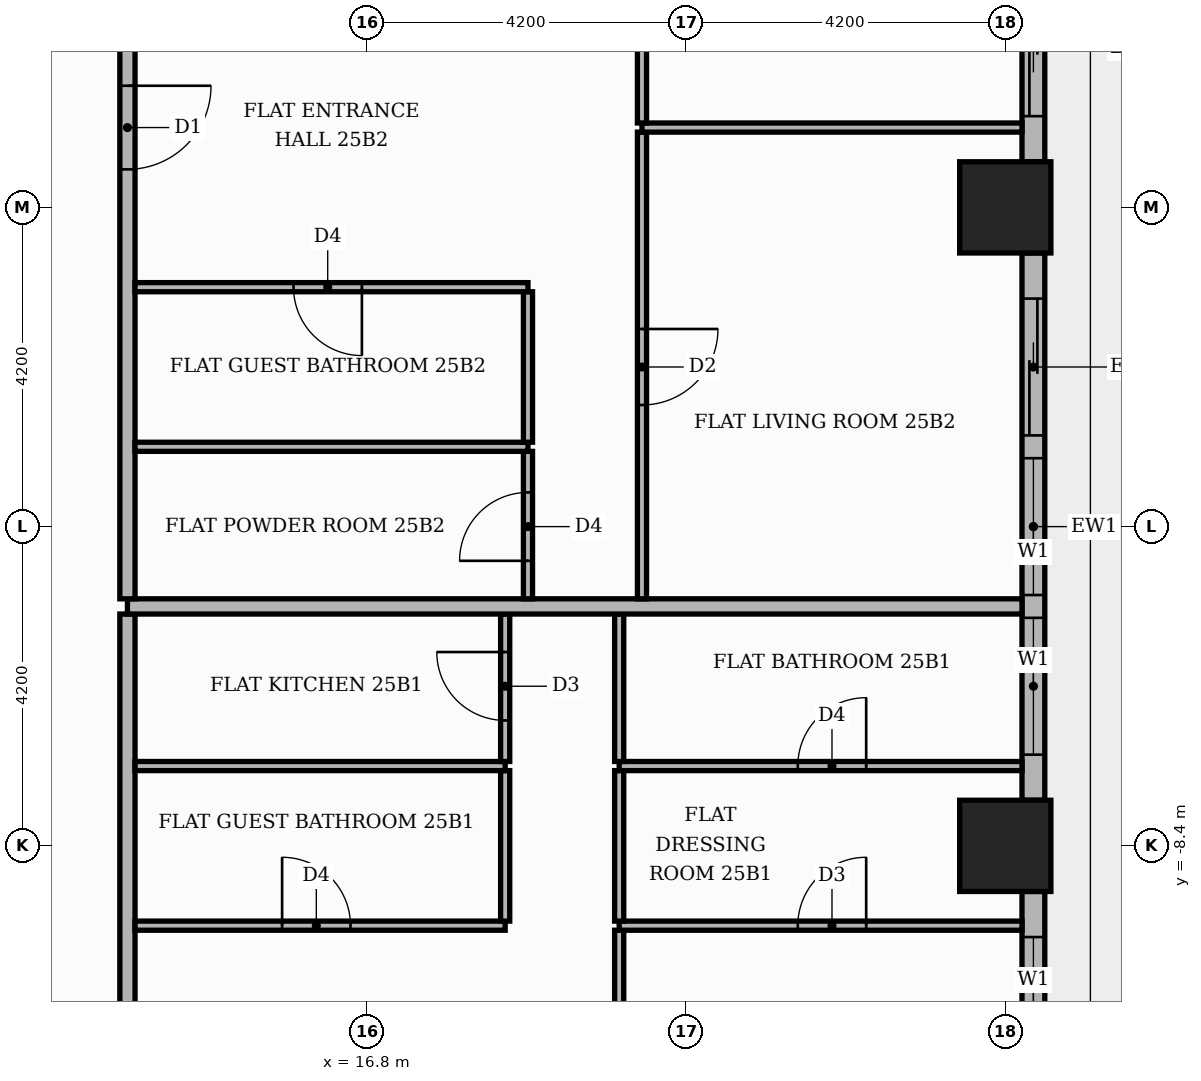
"""IFC4 building model, lengths in metres.
Left out: names, types, materials, properties, quantities, classifications, styles, units other than length and angle.
Written with IfcOpenShell. Run it as: python <this file> out.ifc"""

import sys

from ifc_helpers import new_model, si_unit, direction, frame, frame_2d, origin, origin_2d, place, context, subcontext, project, spatial, rectangle, extrude, element, fill, save


model = new_model("IFC4")
c1 = context("Model", 3, precision=1e-05, world=origin(), true_north=direction((0.0, 1.0)))
c2 = subcontext(c1, "Body", "Model", "MODEL_VIEW")
j1 = project(units=[si_unit("LENGTHUNIT", "METRE"), si_unit("PLANEANGLEUNIT", "RADIAN")], contexts=[c1])
p1 = place(None, origin())
s1 = spatial("IfcSite", under=j1, at=p1, CompositionType="ELEMENT")
p2 = place(p1, origin())
s2 = spatial("IfcBuilding", under=s1, at=p2, CompositionType="ELEMENT")
p3 = place(p2, frame((0.0, 0.0, 106.5)))
s3 = spatial("IfcBuildingStorey", under=s2, at=p3, CompositionType="ELEMENT", Elevation=106.5)
for number, where, z_axis, x_axis in (
    (1, (25.2, 0.0, 0.0), (0.0, 0.0, 1.0), (1.0, 0.0, 0.0)),
    (2, (25.2, -8.4, 0.0), (0.0, 0.0, 1.0), (1.0, 0.0, 0.0)),
):
    element("IfcColumn", number, at=place(p3, frame(where, z_axis=z_axis, x_axis=x_axis)), inside=s3, PredefinedType="COLUMN", context=c2, shape_type="SweptSolid", body=[
        extrude(rectangle(XDim=1.2, YDim=1.2, at=origin_2d()), origin(), (0.0, 0.0, 1.0), 3.9),
    ])
p4 = place(p3, frame((25.57, -16.2, 0.0), z_axis=(0.0, 0.0, 1.0), x_axis=(0.0, 1.0, 0.0)))
e3 = element("IfcWall", 3, at=p4, inside=s3, PredefinedType="STANDARD", context=c2, shape_type="SweptSolid", body=[
    extrude(rectangle(XDim=7.2, YDim=0.3, at=frame_2d((3.6, 0.0))), origin(), (0.0, 0.0, 1.0), 3.48),
])
p5 = place(p4, frame((0.6, 0.0, 0.0)))
e4 = element("IfcOpeningElement", 4, at=p5, cuts=e3, PredefinedType="OPENING", context=c2, shape_type="SweptSolid", body=[
    extrude(rectangle(XDim=1.8, YDim=2.4, at=frame_2d((0.9, 1.2))), frame((0.0, 0.16, 0.0), z_axis=(0.0, -1.0, 0.0), x_axis=(1.0, 0.0, 0.0)), (0.0, 0.0, 1.0), 0.32),
])
p6 = place(p4, frame((2.7, 0.0, 0.0)))
e5 = element("IfcOpeningElement", 5, at=p6, cuts=e3, PredefinedType="OPENING", context=c2, shape_type="SweptSolid", body=[
    extrude(rectangle(XDim=1.8, YDim=2.4, at=frame_2d((0.9, 1.2))), frame((0.0, 0.16, 0.0), z_axis=(0.0, -1.0, 0.0), x_axis=(1.0, 0.0, 0.0)), (0.0, 0.0, 1.0), 0.32),
])
p7 = place(p4, frame((4.8, 0.0, 0.9)))
e6 = element("IfcOpeningElement", 6, at=p7, cuts=e3, PredefinedType="OPENING", context=c2, shape_type="SweptSolid", body=[
    extrude(rectangle(XDim=1.8, YDim=2.1, at=frame_2d((0.9, 1.05))), frame((0.0, 0.16, 0.0), z_axis=(0.0, -1.0, 0.0), x_axis=(1.0, 0.0, 0.0)), (0.0, 0.0, 1.0), 0.32),
])
p8 = place(p3, frame((25.57, -7.8, 0.0), z_axis=(0.0, 0.0, 1.0), x_axis=(0.0, 1.0, 0.0)))
e7 = element("IfcWall", 7, at=p8, inside=s3, PredefinedType="STANDARD", context=c2, shape_type="SweptSolid", body=[
    extrude(rectangle(XDim=7.2, YDim=0.3, at=frame_2d((3.6, 0.0))), origin(), (0.0, 0.0, 1.0), 3.48),
])
p9 = place(p8, frame((0.6, 0.0, 0.9)))
e8 = element("IfcOpeningElement", 8, at=p9, cuts=e7, PredefinedType="OPENING", context=c2, shape_type="SweptSolid", body=[
    extrude(rectangle(XDim=1.8, YDim=2.1, at=frame_2d((0.9, 1.05))), frame((0.0, 0.16, 0.0), z_axis=(0.0, -1.0, 0.0), x_axis=(1.0, 0.0, 0.0)), (0.0, 0.0, 1.0), 0.32),
])
p10 = place(p8, frame((2.7, 0.0, 0.9)))
e9 = element("IfcOpeningElement", 9, at=p10, cuts=e7, PredefinedType="OPENING", context=c2, shape_type="SweptSolid", body=[
    extrude(rectangle(XDim=1.8, YDim=2.1, at=frame_2d((0.9, 1.05))), frame((0.0, 0.16, 0.0), z_axis=(0.0, -1.0, 0.0), x_axis=(1.0, 0.0, 0.0)), (0.0, 0.0, 1.0), 0.32),
])
p11 = place(p8, frame((4.8, 0.0, 0.0)))
e10 = element("IfcOpeningElement", 10, at=p11, cuts=e7, PredefinedType="OPENING", context=c2, shape_type="SweptSolid", body=[
    extrude(rectangle(XDim=1.8, YDim=2.4, at=frame_2d((0.9, 1.2))), frame((0.0, 0.16, 0.0), z_axis=(0.0, -1.0, 0.0), x_axis=(1.0, 0.0, 0.0)), (0.0, 0.0, 1.0), 0.32),
])
p12 = place(p3, frame((25.57, 0.6, 0.0), z_axis=(0.0, 0.0, 1.0), x_axis=(0.0, 1.0, 0.0)))
e11 = element("IfcWall", 11, at=p12, inside=s3, PredefinedType="STANDARD", context=c2, shape_type="SweptSolid", body=[
    extrude(rectangle(XDim=7.2, YDim=0.3, at=frame_2d((3.6, 0.0))), origin(), (0.0, 0.0, 1.0), 3.48),
])
p13 = place(p12, frame((0.6, 0.0, 0.0)))
e12 = element("IfcOpeningElement", 12, at=p13, cuts=e11, PredefinedType="OPENING", context=c2, shape_type="SweptSolid", body=[
    extrude(rectangle(XDim=1.8, YDim=2.4, at=frame_2d((0.9, 1.2))), frame((0.0, 0.16, 0.0), z_axis=(0.0, -1.0, 0.0), x_axis=(1.0, 0.0, 0.0)), (0.0, 0.0, 1.0), 0.32),
])
p14 = place(p12, frame((2.7, 0.0, 0.9)))
e13 = element("IfcOpeningElement", 13, at=p14, cuts=e11, PredefinedType="OPENING", context=c2, shape_type="SweptSolid", body=[
    extrude(rectangle(XDim=1.8, YDim=2.1, at=frame_2d((0.9, 1.05))), frame((0.0, 0.16, 0.0), z_axis=(0.0, -1.0, 0.0), x_axis=(1.0, 0.0, 0.0)), (0.0, 0.0, 1.0), 0.32),
])
p15 = place(p12, frame((4.8, 0.0, 0.9)))
e14 = element("IfcOpeningElement", 14, at=p15, cuts=e11, PredefinedType="OPENING", context=c2, shape_type="SweptSolid", body=[
    extrude(rectangle(XDim=1.8, YDim=2.1, at=frame_2d((0.9, 1.05))), frame((0.0, 0.16, 0.0), z_axis=(0.0, -1.0, 0.0), x_axis=(1.0, 0.0, 0.0)), (0.0, 0.0, 1.0), 0.32),
])
p16 = place(p3, frame((20.12, -13.59, 0.0), z_axis=(0.0, 0.0, 1.0), x_axis=(0.0, 1.0, 0.0)))
e15 = element("IfcWall", 15, at=p16, inside=s3, PredefinedType="PARTITIONING", context=c2, shape_type="SweptSolid", body=[
    extrude(rectangle(XDim=4.08, YDim=0.12, at=frame_2d((2.04, 0.0))), origin(), (0.0, 0.0, 1.0), 3.48),
])
p17 = place(p16, frame((1.59, 0.0, 0.0)))
e16 = element("IfcOpeningElement", 16, at=p17, cuts=e15, PredefinedType="OPENING", context=c2, shape_type="SweptSolid", body=[
    extrude(rectangle(XDim=0.9, YDim=2.1, at=frame_2d((0.45, 1.05))), frame((0.0, 0.07, 0.0), z_axis=(0.0, -1.0, 0.0), x_axis=(1.0, 0.0, 0.0)), (0.0, 0.0, 1.0), 0.14),
])
p18 = place(p3, frame((13.65, -13.55, 0.0), z_axis=(0.0, 0.0, 1.0), x_axis=(0.0, 1.0, 0.0)))
e17 = element("IfcWall", 17, at=p18, inside=s3, PredefinedType="PARTITIONING", context=c2, shape_type="SweptSolid", body=[
    extrude(rectangle(XDim=8.2, YDim=0.2, at=frame_2d((4.1, 0.0))), origin(), (0.0, 0.0, 1.0), 3.48),
])
p19 = place(p18, frame((1.45, 0.0, 0.0)))
e18 = element("IfcOpeningElement", 18, at=p19, cuts=e17, PredefinedType="OPENING", context=c2, shape_type="SweptSolid", body=[
    extrude(rectangle(XDim=1.1, YDim=2.4, at=frame_2d((0.55, 1.2))), frame((0.0, 0.11, 0.0), z_axis=(0.0, -1.0, 0.0), x_axis=(1.0, 0.0, 0.0)), (0.0, 0.0, 1.0), 0.22),
])
p20 = place(p3, frame((13.75, -9.45, 0.0), z_axis=(0.0, 0.0, 1.0), x_axis=(1.0, 0.0, 0.0)))
e19 = element("IfcWall", 19, at=p20, inside=s3, PredefinedType="PARTITIONING", context=c2, shape_type="SweptSolid", body=[
    extrude(rectangle(XDim=4.87, YDim=0.12, at=frame_2d((2.435, 0.0))), origin(), (0.0, 0.0, 1.0), 3.48),
])
p21 = place(p20, frame((1.935, 0.0, 0.0)))
e20 = element("IfcOpeningElement", 20, at=p21, cuts=e19, PredefinedType="OPENING", context=c2, shape_type="SweptSolid", body=[
    extrude(rectangle(XDim=0.9, YDim=2.1, at=frame_2d((0.45, 1.05))), frame((0.0, 0.07, 0.0), z_axis=(0.0, -1.0, 0.0), x_axis=(1.0, 0.0, 0.0)), (0.0, 0.0, 1.0), 0.14),
])
p22 = place(p3, frame((20.12, -9.45, 0.0), z_axis=(0.0, 0.0, 1.0), x_axis=(1.0, 0.0, 0.0)))
e21 = element("IfcWall", 21, at=p22, inside=s3, PredefinedType="PARTITIONING", context=c2, shape_type="SweptSolid", body=[
    extrude(rectangle(XDim=5.3, YDim=0.12, at=frame_2d((2.65, 0.0))), origin(), (0.0, 0.0, 1.0), 3.48),
])
p23 = place(p22, frame((2.35, 0.0, 0.0)))
e22 = element("IfcOpeningElement", 22, at=p23, cuts=e21, PredefinedType="OPENING", context=c2, shape_type="SweptSolid", body=[
    extrude(rectangle(XDim=0.9, YDim=2.1, at=frame_2d((0.45, 1.05))), frame((0.0, 0.07, 0.0), z_axis=(0.0, -1.0, 0.0), x_axis=(1.0, 0.0, 0.0)), (0.0, 0.0, 1.0), 0.14),
])
for number, where, z_axis, x_axis in (
    (23, (18.62, -9.39, 0.0), (0.0, 0.0, 1.0), (0.0, 1.0, 0.0)),
    (24, (20.12, -9.39, 0.0), (0.0, 0.0, 1.0), (0.0, 1.0, 0.0)),
):
    element("IfcWall", number, at=place(p3, frame(where, z_axis=z_axis, x_axis=x_axis)), inside=s3, PredefinedType="PARTITIONING", context=c2, shape_type="SweptSolid", body=[
        extrude(rectangle(XDim=1.98, YDim=0.12, at=frame_2d((0.99, 0.0))), origin(), (0.0, 0.0, 1.0), 3.48),
    ])
p24 = place(p3, frame((13.75, -7.35, 0.0), z_axis=(0.0, 0.0, 1.0), x_axis=(1.0, 0.0, 0.0)))
e25 = element("IfcWall", 25, at=p24, inside=s3, PredefinedType="PARTITIONING", context=c2, shape_type="SweptSolid", body=[
    extrude(rectangle(XDim=4.87, YDim=0.12, at=frame_2d((2.435, 0.0))), origin(), (0.0, 0.0, 1.0), 3.48),
])
p25 = place(p3, frame((20.12, -7.35, 0.0), z_axis=(0.0, 0.0, 1.0), x_axis=(1.0, 0.0, 0.0)))
e26 = element("IfcWall", 26, at=p25, inside=s3, PredefinedType="PARTITIONING", context=c2, shape_type="SweptSolid", body=[
    extrude(rectangle(XDim=5.3, YDim=0.12, at=frame_2d((2.65, 0.0))), origin(), (0.0, 0.0, 1.0), 3.48),
])
p26 = place(p25, frame((2.35, 0.0, 0.0)))
e27 = element("IfcOpeningElement", 27, at=p26, cuts=e26, PredefinedType="OPENING", context=c2, shape_type="SweptSolid", body=[
    extrude(rectangle(XDim=0.9, YDim=2.1, at=frame_2d((0.45, 1.05))), frame((0.0, 0.07, 0.0), z_axis=(0.0, -1.0, 0.0), x_axis=(1.0, 0.0, 0.0)), (0.0, 0.0, 1.0), 0.14),
])
p27 = place(p3, frame((18.62, -7.29, 0.0), z_axis=(0.0, 0.0, 1.0), x_axis=(0.0, 1.0, 0.0)))
e28 = element("IfcWall", 28, at=p27, inside=s3, PredefinedType="PARTITIONING", context=c2, shape_type="SweptSolid", body=[
    extrude(rectangle(XDim=1.94, YDim=0.12, at=frame_2d((0.97, 0.0))), origin(), (0.0, 0.0, 1.0), 3.48),
])
p28 = place(p27, frame((0.54, 0.0, 0.0)))
e29 = element("IfcOpeningElement", 29, at=p28, cuts=e28, PredefinedType="OPENING", context=c2, shape_type="SweptSolid", body=[
    extrude(rectangle(XDim=0.9, YDim=2.1, at=frame_2d((0.45, 1.05))), frame((0.0, 0.07, 0.0), z_axis=(0.0, -1.0, 0.0), x_axis=(1.0, 0.0, 0.0)), (0.0, 0.0, 1.0), 0.14),
])
p29 = place(p3, frame((20.12, -7.29, 0.0), z_axis=(0.0, 0.0, 1.0), x_axis=(0.0, 1.0, 0.0)))
e30 = element("IfcWall", 30, at=p29, inside=s3, PredefinedType="PARTITIONING", context=c2, shape_type="SweptSolid", body=[
    extrude(rectangle(XDim=1.94, YDim=0.12, at=frame_2d((0.97, 0.0))), origin(), (0.0, 0.0, 1.0), 3.48),
])
p30 = place(p3, frame((13.65, -5.25, 0.0), z_axis=(0.0, 0.0, 1.0), x_axis=(1.0, 0.0, 0.0)))
e31 = element("IfcWall", 31, at=p30, inside=s3, PredefinedType="PARTITIONING", context=c2, shape_type="SweptSolid", body=[
    extrude(rectangle(XDim=11.77, YDim=0.2, at=frame_2d((5.885, 0.0))), origin(), (0.0, 0.0, 1.0), 3.48),
])
p31 = place(p3, frame((13.65, -5.15, 0.0), z_axis=(0.0, 0.0, 1.0), x_axis=(0.0, 1.0, 0.0)))
e32 = element("IfcWall", 32, at=p31, inside=s3, PredefinedType="PARTITIONING", context=c2, shape_type="SweptSolid", body=[
    extrude(rectangle(XDim=18.7, YDim=0.2, at=frame_2d((9.35, 0.0))), origin(), (0.0, 0.0, 1.0), 3.48),
])
p32 = place(p31, frame((5.65, 0.0, 0.0)))
e33 = element("IfcOpeningElement", 33, at=p32, cuts=e32, PredefinedType="OPENING", context=c2, shape_type="SweptSolid", body=[
    extrude(rectangle(XDim=1.1, YDim=2.4, at=frame_2d((0.55, 1.2))), frame((0.0, 0.11, 0.0), z_axis=(0.0, -1.0, 0.0), x_axis=(1.0, 0.0, 0.0)), (0.0, 0.0, 1.0), 0.22),
])
p33 = place(p3, frame((18.92, -5.15, 0.0), z_axis=(0.0, 0.0, 1.0), x_axis=(0.0, 1.0, 0.0)))
e34 = element("IfcWall", 34, at=p33, inside=s3, PredefinedType="PARTITIONING", context=c2, shape_type="SweptSolid", body=[
    extrude(rectangle(XDim=1.94, YDim=0.12, at=frame_2d((0.97, 0.0))), origin(), (0.0, 0.0, 1.0), 3.48),
])
p34 = place(p33, frame((0.5, 0.0, 0.0)))
e35 = element("IfcOpeningElement", 35, at=p34, cuts=e34, PredefinedType="OPENING", context=c2, shape_type="SweptSolid", body=[
    extrude(rectangle(XDim=0.9, YDim=2.1, at=frame_2d((0.45, 1.05))), frame((0.0, 0.07, 0.0), z_axis=(0.0, -1.0, 0.0), x_axis=(1.0, 0.0, 0.0)), (0.0, 0.0, 1.0), 0.14),
])
p35 = place(p3, frame((20.42, -5.15, 0.0), z_axis=(0.0, 0.0, 1.0), x_axis=(0.0, 1.0, 0.0)))
e36 = element("IfcWall", 36, at=p35, inside=s3, PredefinedType="PARTITIONING", context=c2, shape_type="SweptSolid", body=[
    extrude(rectangle(XDim=6.14, YDim=0.12, at=frame_2d((3.07, 0.0))), origin(), (0.0, 0.0, 1.0), 3.48),
])
p36 = place(p35, frame((2.55, 0.0, 0.0)))
e37 = element("IfcOpeningElement", 37, at=p36, cuts=e36, PredefinedType="OPENING", context=c2, shape_type="SweptSolid", body=[
    extrude(rectangle(XDim=1.0, YDim=2.1, at=frame_2d((0.5, 1.05))), frame((0.0, 0.07, 0.0), z_axis=(0.0, -1.0, 0.0), x_axis=(1.0, 0.0, 0.0)), (0.0, 0.0, 1.0), 0.14),
])
p37 = place(p3, frame((13.75, -3.15, 0.0), z_axis=(0.0, 0.0, 1.0), x_axis=(1.0, 0.0, 0.0)))
e38 = element("IfcWall", 38, at=p37, inside=s3, PredefinedType="PARTITIONING", context=c2, shape_type="SweptSolid", body=[
    extrude(rectangle(XDim=5.17, YDim=0.12, at=frame_2d((2.585, 0.0))), origin(), (0.0, 0.0, 1.0), 3.48),
])
p38 = place(p3, frame((18.92, -3.09, 0.0), z_axis=(0.0, 0.0, 1.0), x_axis=(0.0, 1.0, 0.0)))
e39 = element("IfcWall", 39, at=p38, inside=s3, PredefinedType="PARTITIONING", context=c2, shape_type="SweptSolid", body=[
    extrude(rectangle(XDim=1.98, YDim=0.12, at=frame_2d((0.99, 0.0))), origin(), (0.0, 0.0, 1.0), 3.48),
])
p39 = place(p3, frame((13.75, -1.05, 0.0), z_axis=(0.0, 0.0, 1.0), x_axis=(1.0, 0.0, 0.0)))
e40 = element("IfcWall", 40, at=p39, inside=s3, PredefinedType="PARTITIONING", context=c2, shape_type="SweptSolid", body=[
    extrude(rectangle(XDim=5.17, YDim=0.12, at=frame_2d((2.585, 0.0))), origin(), (0.0, 0.0, 1.0), 3.48),
])
p40 = place(p39, frame((2.085, 0.0, 0.0)))
e41 = element("IfcOpeningElement", 41, at=p40, cuts=e40, PredefinedType="OPENING", context=c2, shape_type="SweptSolid", body=[
    extrude(rectangle(XDim=0.9, YDim=2.1, at=frame_2d((0.45, 1.05))), frame((0.0, 0.07, 0.0), z_axis=(0.0, -1.0, 0.0), x_axis=(1.0, 0.0, 0.0)), (0.0, 0.0, 1.0), 0.14),
])
p41 = place(p3, frame((20.42, 1.05, 0.0), z_axis=(0.0, 0.0, 1.0), x_axis=(1.0, 0.0, 0.0)))
e42 = element("IfcWall", 42, at=p41, inside=s3, PredefinedType="PARTITIONING", context=c2, shape_type="SweptSolid", body=[
    extrude(rectangle(XDim=5.0, YDim=0.12, at=frame_2d((2.5, 0.0))), origin(), (0.0, 0.0, 1.0), 3.48),
])
p42 = place(p3, frame((20.42, 1.11, 0.0), z_axis=(0.0, 0.0, 1.0), x_axis=(0.0, 1.0, 0.0)))
e43 = element("IfcWall", 43, at=p42, inside=s3, PredefinedType="PARTITIONING", context=c2, shape_type="SweptSolid", body=[
    extrude(rectangle(XDim=4.08, YDim=0.12, at=frame_2d((2.04, 0.0))), origin(), (0.0, 0.0, 1.0), 3.48),
])
p43 = place(p42, frame((1.59, 0.0, 0.0)))
e44 = element("IfcOpeningElement", 44, at=p43, cuts=e43, PredefinedType="OPENING", context=c2, shape_type="SweptSolid", body=[
    extrude(rectangle(XDim=0.9, YDim=2.1, at=frame_2d((0.45, 1.05))), frame((0.0, 0.07, 0.0), z_axis=(0.0, -1.0, 0.0), x_axis=(1.0, 0.0, 0.0)), (0.0, 0.0, 1.0), 0.14),
])
p44 = place(p7, origin())
e45 = element("IfcWindow", 45, at=p44, inside=s3, PartitioningType="SINGLE_PANEL", PredefinedType="WINDOW", context=c2, shape_type="SweptSolid", body=[
    extrude(rectangle(XDim=1.8, YDim=2.1, at=frame_2d((0.9, 1.05))), frame((0.0, 0.03, 0.0), z_axis=(0.0, -1.0, 0.0), x_axis=(1.0, 0.0, 0.0)), (0.0, 0.0, 1.0), 0.06),
])
fill(e6, e45)
p45 = place(p9, origin())
e46 = element("IfcWindow", 46, at=p45, inside=s3, PartitioningType="SINGLE_PANEL", PredefinedType="WINDOW", context=c2, shape_type="SweptSolid", body=[
    extrude(rectangle(XDim=1.8, YDim=2.1, at=frame_2d((0.9, 1.05))), frame((0.0, 0.03, 0.0), z_axis=(0.0, -1.0, 0.0), x_axis=(1.0, 0.0, 0.0)), (0.0, 0.0, 1.0), 0.06),
])
fill(e8, e46)
p46 = place(p10, origin())
e47 = element("IfcWindow", 47, at=p46, inside=s3, PartitioningType="SINGLE_PANEL", PredefinedType="WINDOW", context=c2, shape_type="SweptSolid", body=[
    extrude(rectangle(XDim=1.8, YDim=2.1, at=frame_2d((0.9, 1.05))), frame((0.0, 0.03, 0.0), z_axis=(0.0, -1.0, 0.0), x_axis=(1.0, 0.0, 0.0)), (0.0, 0.0, 1.0), 0.06),
])
fill(e9, e47)
p47 = place(p11, origin())
e48 = element("IfcDoor", 48, at=p47, inside=s3, OperationType="SLIDING_TO_RIGHT", PredefinedType="DOOR", context=c2, shape_type="SweptSolid", body=[
    extrude(rectangle(XDim=1.8, YDim=2.4, at=frame_2d((0.9, 1.2))), frame((0.0, 0.025, 0.0), z_axis=(0.0, -1.0, 0.0), x_axis=(1.0, 0.0, 0.0)), (0.0, 0.0, 1.0), 0.05),
])
fill(e10, e48)
p48 = place(p13, origin())
e49 = element("IfcDoor", 49, at=p48, inside=s3, OperationType="SLIDING_TO_LEFT", PredefinedType="DOOR", context=c2, shape_type="SweptSolid", body=[
    extrude(rectangle(XDim=1.8, YDim=2.4, at=frame_2d((0.9, 1.2))), frame((0.0, 0.025, 0.0), z_axis=(0.0, -1.0, 0.0), x_axis=(1.0, 0.0, 0.0)), (0.0, 0.0, 1.0), 0.05),
])
fill(e12, e49)
p49 = place(p21, origin())
e50 = element("IfcDoor", 50, at=p49, inside=s3, OperationType="SINGLE_SWING_LEFT", PredefinedType="DOOR", context=c2, shape_type="SweptSolid", body=[
    extrude(rectangle(XDim=0.9, YDim=2.1, at=frame_2d((0.45, 1.05))), frame((0.0, 0.025, 0.0), z_axis=(0.0, -1.0, 0.0), x_axis=(1.0, 0.0, 0.0)), (0.0, 0.0, 1.0), 0.05),
])
fill(e20, e50)
p50 = place(p28, origin())
e51 = element("IfcDoor", 51, at=p50, inside=s3, OperationType="SINGLE_SWING_RIGHT", PredefinedType="DOOR", context=c2, shape_type="SweptSolid", body=[
    extrude(rectangle(XDim=0.9, YDim=2.1, at=frame_2d((0.45, 1.05))), frame((0.0, 0.025, 0.0), z_axis=(0.0, -1.0, 0.0), x_axis=(1.0, 0.0, 0.0)), (0.0, 0.0, 1.0), 0.05),
])
fill(e29, e51)
p51 = place(p23, origin())
e52 = element("IfcDoor", 52, at=p51, inside=s3, OperationType="SINGLE_SWING_RIGHT", PredefinedType="DOOR", context=c2, shape_type="SweptSolid", body=[
    extrude(rectangle(XDim=0.9, YDim=2.1, at=frame_2d((0.45, 1.05))), frame((0.0, 0.025, 0.0), z_axis=(0.0, -1.0, 0.0), x_axis=(1.0, 0.0, 0.0)), (0.0, 0.0, 1.0), 0.05),
])
fill(e22, e52)
p52 = place(p26, origin())
e53 = element("IfcDoor", 53, at=p52, inside=s3, OperationType="SINGLE_SWING_RIGHT", PredefinedType="DOOR", context=c2, shape_type="SweptSolid", body=[
    extrude(rectangle(XDim=0.9, YDim=2.1, at=frame_2d((0.45, 1.05))), frame((0.0, 0.025, 0.0), z_axis=(0.0, -1.0, 0.0), x_axis=(1.0, 0.0, 0.0)), (0.0, 0.0, 1.0), 0.05),
])
fill(e27, e53)
p53 = place(p32, frame((1.1, 0.0, 0.0), z_axis=(0.0, 0.0, 1.0), x_axis=(-1.0, 0.0, 0.0)))
e54 = element("IfcDoor", 54, at=p53, inside=s3, OperationType="SINGLE_SWING_RIGHT", PredefinedType="DOOR", context=c2, shape_type="SweptSolid", body=[
    extrude(rectangle(XDim=1.1, YDim=2.4, at=frame_2d((0.55, 1.2))), frame((0.0, 0.025, 0.0), z_axis=(0.0, -1.0, 0.0), x_axis=(1.0, 0.0, 0.0)), (0.0, 0.0, 1.0), 0.05),
])
fill(e33, e54)
p54 = place(p34, origin())
e55 = element("IfcDoor", 55, at=p54, inside=s3, OperationType="SINGLE_SWING_LEFT", PredefinedType="DOOR", context=c2, shape_type="SweptSolid", body=[
    extrude(rectangle(XDim=0.9, YDim=2.1, at=frame_2d((0.45, 1.05))), frame((0.0, 0.025, 0.0), z_axis=(0.0, -1.0, 0.0), x_axis=(1.0, 0.0, 0.0)), (0.0, 0.0, 1.0), 0.05),
])
fill(e35, e55)
p55 = place(p40, frame((0.9, 0.0, 0.0), z_axis=(0.0, 0.0, 1.0), x_axis=(-1.0, 0.0, 0.0)))
e56 = element("IfcDoor", 56, at=p55, inside=s3, OperationType="SINGLE_SWING_RIGHT", PredefinedType="DOOR", context=c2, shape_type="SweptSolid", body=[
    extrude(rectangle(XDim=0.9, YDim=2.1, at=frame_2d((0.45, 1.05))), frame((0.0, 0.025, 0.0), z_axis=(0.0, -1.0, 0.0), x_axis=(1.0, 0.0, 0.0)), (0.0, 0.0, 1.0), 0.05),
])
fill(e41, e56)
p56 = place(p36, frame((1.0, 0.0, 0.0), z_axis=(0.0, 0.0, 1.0), x_axis=(-1.0, 0.0, 0.0)))
e57 = element("IfcDoor", 57, at=p56, inside=s3, OperationType="SINGLE_SWING_RIGHT", PredefinedType="DOOR", context=c2, shape_type="SweptSolid", body=[
    extrude(rectangle(XDim=1.0, YDim=2.1, at=frame_2d((0.5, 1.05))), frame((0.0, 0.025, 0.0), z_axis=(0.0, -1.0, 0.0), x_axis=(1.0, 0.0, 0.0)), (0.0, 0.0, 1.0), 0.05),
])
fill(e37, e57)
save(model, sys.argv[1])
